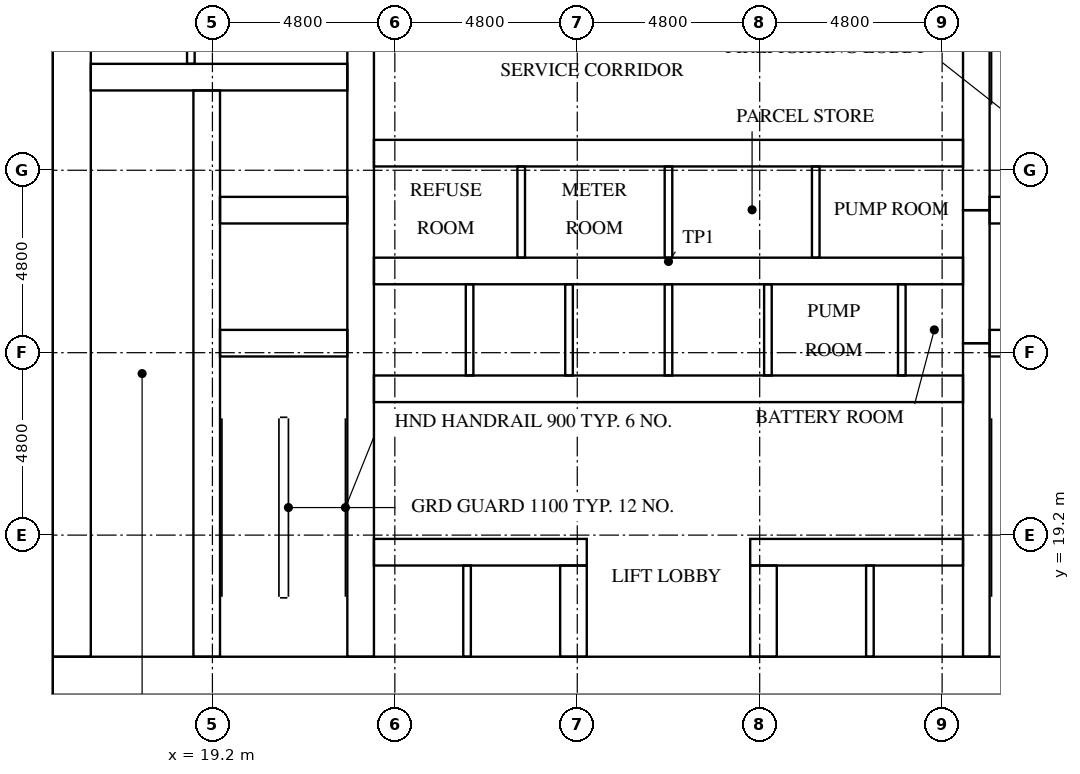
"""IFC4 building model, lengths in metres.
Left out: names, types, materials, properties, quantities, classifications, styles, units other than length and angle.
Written with IfcOpenShell. Run it as: python <this file> out.ifc"""

import sys

from ifc_helpers import new_model, si_unit, direction, frame, frame_2d, origin, place, context, subcontext, project, spatial, rectangle, extrude, element, fill, save


model = new_model("IFC4")
c1 = context("Model", 3, precision=1e-05, world=origin(), true_north=direction((0.0, 1.0)))
c2 = subcontext(c1, "Body", "Model", "MODEL_VIEW")
j1 = project(units=[si_unit("LENGTHUNIT", "METRE"), si_unit("PLANEANGLEUNIT", "RADIAN")], contexts=[c1])
p1 = place(None, origin())
s1 = spatial("IfcSite", under=j1, at=p1, CompositionType="ELEMENT")
p2 = place(p1, origin())
s2 = spatial("IfcBuilding", under=s1, at=p2, CompositionType="ELEMENT")
p3 = place(p2, frame((0.0, 0.0, 24.0)))
s3 = spatial("IfcBuildingStorey", under=s2, at=p3, CompositionType="ELEMENT", Elevation=24.0)
p4 = place(p3, frame((15.0, 15.5, 0.0), z_axis=(0.0, 0.0, 1.0), x_axis=(1.0, 0.0, 0.0)))
e1 = element("IfcWall", 1, at=p4, inside=s3, PredefinedType="SHEAR", context=c2, shape_type="SweptSolid", body=[
    extrude(rectangle(XDim=32.4, YDim=1.0, at=frame_2d((16.2, 0.0))), origin(), (0.0, 0.0, 1.0), 5.1),
])
p5 = place(p4, frame((15.3, 0.0, 0.0)))
e2 = element("IfcOpeningElement", 2, at=p5, cuts=e1, PredefinedType="OPENING", context=c2, shape_type="SweptSolid", body=[
    extrude(rectangle(XDim=1.8, YDim=2.1, at=frame_2d((0.9, 1.05))), frame((0.0, 0.51, 0.0), z_axis=(0.0, -1.0, 0.0), x_axis=(1.0, 0.0, 0.0)), (0.0, 0.0, 1.0), 1.02),
])
p6 = place(p3, frame((15.5, 16.0, 0.0), z_axis=(0.0, 0.0, 1.0), x_axis=(0.0, 1.0, 0.0)))
e3 = element("IfcWall", 3, at=p6, inside=s3, PredefinedType="SHEAR", context=c2, shape_type="SweptSolid", body=[
    extrude(rectangle(XDim=20.8, YDim=1.0, at=frame_2d((10.4, 0.0))), origin(), (0.0, 0.0, 1.0), 5.1),
])
p7 = place(p6, frame((4.76, 0.0, 0.0)))
e4 = element("IfcOpeningElement", 4, at=p7, cuts=e3, PredefinedType="OPENING", context=c2, shape_type="SweptSolid", body=[
    extrude(rectangle(XDim=1.2, YDim=2.1, at=frame_2d((0.6, 1.05))), frame((0.0, 0.51, 0.0), z_axis=(0.0, -1.0, 0.0), x_axis=(1.0, 0.0, 0.0)), (0.0, 0.0, 1.0), 1.02),
])
p8 = place(p3, frame((19.05, 16.0, 0.0), z_axis=(0.0, 0.0, 1.0), x_axis=(0.0, 1.0, 0.0)))
e5 = element("IfcWall", 5, at=p8, inside=s3, PredefinedType="SHEAR", context=c2, shape_type="SweptSolid", body=[
    extrude(rectangle(XDim=14.9, YDim=0.7, at=frame_2d((7.45, 0.0))), origin(), (0.0, 0.0, 1.0), 5.1),
])
p9 = place(p8, frame((9.45, 0.0, 0.0)))
e6 = element("IfcOpeningElement", 6, at=p9, cuts=e5, PredefinedType="OPENING", context=c2, shape_type="SweptSolid", body=[
    extrude(rectangle(XDim=1.1, YDim=2.1, at=frame_2d((0.55, 1.05))), frame((0.0, 0.36, 0.0), z_axis=(0.0, -1.0, 0.0), x_axis=(1.0, 0.0, 0.0)), (0.0, 0.0, 1.0), 0.72),
])
p10 = place(p8, frame((12.95, 0.0, 0.0)))
e7 = element("IfcOpeningElement", 7, at=p10, cuts=e5, PredefinedType="OPENING", context=c2, shape_type="SweptSolid", body=[
    extrude(rectangle(XDim=1.1, YDim=2.1, at=frame_2d((0.55, 1.05))), frame((0.0, 0.36, 0.0), z_axis=(0.0, -1.0, 0.0), x_axis=(1.0, 0.0, 0.0)), (0.0, 0.0, 1.0), 0.72),
])
p11 = place(p8, frame((0.2, 0.0, 0.0)))
e8 = element("IfcOpeningElement", 8, at=p11, cuts=e5, PredefinedType="OPENING", context=c2, shape_type="SweptSolid", body=[
    extrude(rectangle(XDim=1.2, YDim=2.1, at=frame_2d((0.6, 1.05))), frame((0.0, 0.36, 0.0), z_axis=(0.0, -1.0, 0.0), x_axis=(1.0, 0.0, 0.0)), (0.0, 0.0, 1.0), 0.72),
])
p12 = place(p3, frame((23.1, 16.0, 0.0), z_axis=(0.0, 0.0, 1.0), x_axis=(0.0, 1.0, 0.0)))
e9 = element("IfcWall", 9, at=p12, inside=s3, PredefinedType="SHEAR", context=c2, shape_type="SweptSolid", body=[
    extrude(rectangle(XDim=20.8, YDim=0.7, at=frame_2d((10.4, 0.0))), origin(), (0.0, 0.0, 1.0), 5.1),
])
p13 = place(p3, frame((39.3, 16.0, 0.0), z_axis=(0.0, 0.0, 1.0), x_axis=(0.0, 1.0, 0.0)))
e10 = element("IfcWall", 10, at=p13, inside=s3, PredefinedType="SHEAR", context=c2, shape_type="SweptSolid", body=[
    extrude(rectangle(XDim=8.25, YDim=0.7, at=frame_2d((4.125, 0.0))), origin(), (0.0, 0.0, 1.0), 5.1),
])
p14 = place(p3, frame((39.3, 24.25, 0.0), z_axis=(0.0, 0.0, 1.0), x_axis=(0.0, 1.0, 0.0)))
e11 = element("IfcWall", 11, at=p14, inside=s3, PredefinedType="SHEAR", context=c2, shape_type="SweptSolid", body=[
    extrude(rectangle(XDim=3.5, YDim=0.7, at=frame_2d((1.75, 0.0))), origin(), (0.0, 0.0, 1.0), 5.1),
])
p15 = place(p3, frame((39.3, 27.75, 0.0), z_axis=(0.0, 0.0, 1.0), x_axis=(0.0, 1.0, 0.0)))
e12 = element("IfcWall", 12, at=p15, inside=s3, PredefinedType="SHEAR", context=c2, shape_type="SweptSolid", body=[
    extrude(rectangle(XDim=9.05, YDim=0.7, at=frame_2d((4.525, 0.0))), origin(), (0.0, 0.0, 1.0), 5.1),
])
for number, where, z_axis, x_axis in (
    (13, (19.4, 24.25, 0.0), (0.0, 0.0, 1.0), (1.0, 0.0, 0.0)),
    (14, (19.4, 27.75, 0.0), (0.0, 0.0, 1.0), (1.0, 0.0, 0.0)),
):
    element("IfcWall", number, at=place(p3, frame(where, z_axis=z_axis, x_axis=x_axis)), inside=s3, PredefinedType="SHEAR", context=c2, shape_type="SweptSolid", body=[
        extrude(rectangle(XDim=3.35, YDim=0.7, at=frame_2d((1.675, 0.0))), origin(), (0.0, 0.0, 1.0), 5.1),
    ])
p16 = place(p3, frame((16.0, 31.25, 0.0), z_axis=(0.0, 0.0, 1.0), x_axis=(1.0, 0.0, 0.0)))
e15 = element("IfcWall", 15, at=p16, inside=s3, PredefinedType="SHEAR", context=c2, shape_type="SweptSolid", body=[
    extrude(rectangle(XDim=6.75, YDim=0.7, at=frame_2d((3.375, 0.0))), origin(), (0.0, 0.0, 1.0), 5.1),
])
for number, where, z_axis, x_axis in (
    (16, (39.65, 24.25, 0.0), (0.0, 0.0, 1.0), (1.0, 0.0, 0.0)),
    (17, (39.65, 27.75, 0.0), (0.0, 0.0, 1.0), (1.0, 0.0, 0.0)),
):
    element("IfcWall", number, at=place(p3, frame(where, z_axis=z_axis, x_axis=x_axis)), inside=s3, PredefinedType="SHEAR", context=c2, shape_type="SweptSolid", body=[
        extrude(rectangle(XDim=3.35, YDim=0.7, at=frame_2d((1.675, 0.0))), origin(), (0.0, 0.0, 1.0), 5.1),
    ])
p17 = place(p3, frame((23.45, 18.75, 0.0), z_axis=(0.0, 0.0, 1.0), x_axis=(1.0, 0.0, 0.0)))
e18 = element("IfcWall", 18, at=p17, inside=s3, PredefinedType="SHEAR", context=c2, shape_type="SweptSolid", body=[
    extrude(rectangle(XDim=5.6, YDim=0.7, at=frame_2d((2.8, 0.0))), origin(), (0.0, 0.0, 1.0), 5.1),
])
p18 = place(p17, frame((0.625, 0.0, 0.0)))
e19 = element("IfcOpeningElement", 19, at=p18, cuts=e18, PredefinedType="OPENING", context=c2, shape_type="SweptSolid", body=[
    extrude(rectangle(XDim=1.1, YDim=2.1, at=frame_2d((0.55, 1.05))), frame((0.0, 0.36, 0.0), z_axis=(0.0, -1.0, 0.0), x_axis=(1.0, 0.0, 0.0)), (0.0, 0.0, 1.0), 0.72),
])
p19 = place(p17, frame((3.175, 0.0, 0.0)))
e20 = element("IfcOpeningElement", 20, at=p19, cuts=e18, PredefinedType="OPENING", context=c2, shape_type="SweptSolid", body=[
    extrude(rectangle(XDim=1.1, YDim=2.1, at=frame_2d((0.55, 1.05))), frame((0.0, 0.36, 0.0), z_axis=(0.0, -1.0, 0.0), x_axis=(1.0, 0.0, 0.0)), (0.0, 0.0, 1.0), 0.72),
])
p20 = place(p3, frame((33.35, 18.75, 0.0), z_axis=(0.0, 0.0, 1.0), x_axis=(1.0, 0.0, 0.0)))
e21 = element("IfcWall", 21, at=p20, inside=s3, PredefinedType="SHEAR", context=c2, shape_type="SweptSolid", body=[
    extrude(rectangle(XDim=5.6, YDim=0.7, at=frame_2d((2.8, 0.0))), origin(), (0.0, 0.0, 1.0), 5.1),
])
p21 = place(p20, frame((1.325, 0.0, 0.0)))
e22 = element("IfcOpeningElement", 22, at=p21, cuts=e21, PredefinedType="OPENING", context=c2, shape_type="SweptSolid", body=[
    extrude(rectangle(XDim=1.1, YDim=2.1, at=frame_2d((0.55, 1.05))), frame((0.0, 0.36, 0.0), z_axis=(0.0, -1.0, 0.0), x_axis=(1.0, 0.0, 0.0)), (0.0, 0.0, 1.0), 0.72),
])
p22 = place(p20, frame((3.875, 0.0, 0.0)))
e23 = element("IfcOpeningElement", 23, at=p22, cuts=e21, PredefinedType="OPENING", context=c2, shape_type="SweptSolid", body=[
    extrude(rectangle(XDim=1.1, YDim=2.1, at=frame_2d((0.55, 1.05))), frame((0.0, 0.36, 0.0), z_axis=(0.0, -1.0, 0.0), x_axis=(1.0, 0.0, 0.0)), (0.0, 0.0, 1.0), 0.72),
])
p23 = place(p3, frame((23.45, 23.05, 0.0), z_axis=(0.0, 0.0, 1.0), x_axis=(1.0, 0.0, 0.0)))
e24 = element("IfcWall", 24, at=p23, inside=s3, PredefinedType="SHEAR", context=c2, shape_type="SweptSolid", body=[
    extrude(rectangle(XDim=15.5, YDim=0.7, at=frame_2d((7.75, 0.0))), origin(), (0.0, 0.0, 1.0), 5.1),
])
p24 = place(p23, frame((0.658, 0.0, 0.0)))
e25 = element("IfcOpeningElement", 25, at=p24, cuts=e24, PredefinedType="OPENING", context=c2, shape_type="SweptSolid", body=[
    extrude(rectangle(XDim=1.1, YDim=2.1, at=frame_2d((0.55, 1.05))), frame((0.0, 0.36, 0.0), z_axis=(0.0, -1.0, 0.0), x_axis=(1.0, 0.0, 0.0)), (0.0, 0.0, 1.0), 0.72),
])
p25 = place(p23, frame((3.275, 0.0, 0.0)))
e26 = element("IfcOpeningElement", 26, at=p25, cuts=e24, PredefinedType="OPENING", context=c2, shape_type="SweptSolid", body=[
    extrude(rectangle(XDim=1.1, YDim=2.1, at=frame_2d((0.55, 1.05))), frame((0.0, 0.36, 0.0), z_axis=(0.0, -1.0, 0.0), x_axis=(1.0, 0.0, 0.0)), (0.0, 0.0, 1.0), 0.72),
])
p26 = place(p23, frame((11.628, 0.0, 0.0)))
e27 = element("IfcOpeningElement", 27, at=p26, cuts=e24, PredefinedType="OPENING", context=c2, shape_type="SweptSolid", body=[
    extrude(rectangle(XDim=1.0, YDim=2.1, at=frame_2d((0.5, 1.05))), frame((0.0, 0.36, 0.0), z_axis=(0.0, -1.0, 0.0), x_axis=(1.0, 0.0, 0.0)), (0.0, 0.0, 1.0), 0.72),
])
p27 = place(p23, frame((14.245, 0.0, 0.0)))
e28 = element("IfcOpeningElement", 28, at=p27, cuts=e24, PredefinedType="OPENING", context=c2, shape_type="SweptSolid", body=[
    extrude(rectangle(XDim=1.0, YDim=2.1, at=frame_2d((0.5, 1.05))), frame((0.0, 0.36, 0.0), z_axis=(0.0, -1.0, 0.0), x_axis=(1.0, 0.0, 0.0)), (0.0, 0.0, 1.0), 0.72),
])
p28 = place(p3, frame((23.45, 26.15, 0.0), z_axis=(0.0, 0.0, 1.0), x_axis=(1.0, 0.0, 0.0)))
e29 = element("IfcWall", 29, at=p28, inside=s3, PredefinedType="SHEAR", context=c2, shape_type="SweptSolid", body=[
    extrude(rectangle(XDim=15.5, YDim=0.7, at=frame_2d((7.75, 0.0))), origin(), (0.0, 0.0, 1.0), 5.1),
])
p29 = place(p3, frame((23.45, 29.25, 0.0), z_axis=(0.0, 0.0, 1.0), x_axis=(1.0, 0.0, 0.0)))
e30 = element("IfcWall", 30, at=p29, inside=s3, PredefinedType="SHEAR", context=c2, shape_type="SweptSolid", body=[
    extrude(rectangle(XDim=15.5, YDim=0.7, at=frame_2d((7.75, 0.0))), origin(), (0.0, 0.0, 1.0), 5.1),
])
p30 = place(p29, frame((1.387, 0.0, 0.0)))
e31 = element("IfcOpeningElement", 31, at=p30, cuts=e30, PredefinedType="OPENING", context=c2, shape_type="SweptSolid", body=[
    extrude(rectangle(XDim=1.0, YDim=2.1, at=frame_2d((0.5, 1.05))), frame((0.0, 0.36, 0.0), z_axis=(0.0, -1.0, 0.0), x_axis=(1.0, 0.0, 0.0)), (0.0, 0.0, 1.0), 0.72),
])
p31 = place(p29, frame((5.312, 0.0, 0.0)))
e32 = element("IfcOpeningElement", 32, at=p31, cuts=e30, PredefinedType="OPENING", context=c2, shape_type="SweptSolid", body=[
    extrude(rectangle(XDim=1.0, YDim=2.1, at=frame_2d((0.5, 1.05))), frame((0.0, 0.36, 0.0), z_axis=(0.0, -1.0, 0.0), x_axis=(1.0, 0.0, 0.0)), (0.0, 0.0, 1.0), 0.72),
])
p32 = place(p29, frame((9.188, 0.0, 0.0)))
e33 = element("IfcOpeningElement", 33, at=p32, cuts=e30, PredefinedType="OPENING", context=c2, shape_type="SweptSolid", body=[
    extrude(rectangle(XDim=1.0, YDim=2.1, at=frame_2d((0.5, 1.05))), frame((0.0, 0.36, 0.0), z_axis=(0.0, -1.0, 0.0), x_axis=(1.0, 0.0, 0.0)), (0.0, 0.0, 1.0), 0.72),
])
p33 = place(p29, frame((13.113, 0.0, 0.0)))
e34 = element("IfcOpeningElement", 34, at=p33, cuts=e30, PredefinedType="OPENING", context=c2, shape_type="SweptSolid", body=[
    extrude(rectangle(XDim=1.0, YDim=2.1, at=frame_2d((0.5, 1.05))), frame((0.0, 0.36, 0.0), z_axis=(0.0, -1.0, 0.0), x_axis=(1.0, 0.0, 0.0)), (0.0, 0.0, 1.0), 0.72),
])
for number, where, z_axis, x_axis in (
    (35, (28.7, 16.0, 0.0), (0.0, 0.0, 1.0), (0.0, 1.0, 0.0)),
    (36, (33.7, 16.0, 0.0), (0.0, 0.0, 1.0), (0.0, 1.0, 0.0)),
):
    element("IfcWall", number, at=place(p3, frame(where, z_axis=z_axis, x_axis=x_axis)), inside=s3, PredefinedType="SHEAR", context=c2, shape_type="SweptSolid", body=[
        extrude(rectangle(XDim=2.4, YDim=0.7, at=frame_2d((1.2, 0.0))), origin(), (0.0, 0.0, 1.0), 5.1),
    ])
for number, where, z_axis, x_axis in (
    (37, (25.967, 23.4, 0.0), (0.0, 0.0, 1.0), (0.0, 1.0, 0.0)),
    (38, (28.583, 23.4, 0.0), (0.0, 0.0, 1.0), (0.0, 1.0, 0.0)),
    (39, (31.2, 23.4, 0.0), (0.0, 0.0, 1.0), (0.0, 1.0, 0.0)),
    (40, (33.817, 23.4, 0.0), (0.0, 0.0, 1.0), (0.0, 1.0, 0.0)),
):
    element("IfcWall", number, at=place(p3, frame(where, z_axis=z_axis, x_axis=x_axis)), inside=s3, PredefinedType="SOLIDWALL", context=c2, shape_type="SweptSolid", body=[
        extrude(rectangle(XDim=2.4, YDim=0.2, at=frame_2d((1.2, 0.0))), origin(), (0.0, 0.0, 1.0), 5.1),
    ])
for number, where, z_axis, x_axis in (
    (41, (25.9, 16.0, 0.0), (0.0, 0.0, 1.0), (0.0, 1.0, 0.0)),
    (42, (36.5, 16.0, 0.0), (0.0, 0.0, 1.0), (0.0, 1.0, 0.0)),
):
    element("IfcWall", number, at=place(p3, frame(where, z_axis=z_axis, x_axis=x_axis)), inside=s3, PredefinedType="SOLIDWALL", context=c2, shape_type="SweptSolid", body=[
        extrude(rectangle(XDim=2.4, YDim=0.2, at=frame_2d((1.2, 0.0))), origin(), (0.0, 0.0, 1.0), 5.1),
    ])
p34 = place(p3, frame((18.633, 31.6, 0.0), z_axis=(0.0, 0.0, 1.0), x_axis=(0.0, 1.0, 0.0)))
e43 = element("IfcWall", 43, at=p34, inside=s3, PredefinedType="PARTITIONING", context=c2, shape_type="SweptSolid", body=[
    extrude(rectangle(XDim=5.2, YDim=0.2, at=frame_2d((2.6, 0.0))), origin(), (0.0, 0.0, 1.0), 5.1),
])
p35 = place(p3, frame((37.339, 23.4, 0.0), z_axis=(0.0, 0.0, 1.0), x_axis=(0.0, 1.0, 0.0)))
e44 = element("IfcWall", 44, at=p35, inside=s3, PredefinedType="PARTITIONING", context=c2, shape_type="SweptSolid", body=[
    extrude(rectangle(XDim=2.4, YDim=0.2, at=frame_2d((1.2, 0.0))), origin(), (0.0, 0.0, 1.0), 5.1),
])
for number, where, z_axis, x_axis in (
    (45, (27.325, 26.5, 0.0), (0.0, 0.0, 1.0), (0.0, 1.0, 0.0)),
    (46, (31.2, 26.5, 0.0), (0.0, 0.0, 1.0), (0.0, 1.0, 0.0)),
    (47, (35.075, 26.5, 0.0), (0.0, 0.0, 1.0), (0.0, 1.0, 0.0)),
):
    element("IfcWall", number, at=place(p3, frame(where, z_axis=z_axis, x_axis=x_axis)), inside=s3, PredefinedType="PARTITIONING", context=c2, shape_type="SweptSolid", body=[
        extrude(rectangle(XDim=2.4, YDim=0.2, at=frame_2d((1.2, 0.0))), origin(), (0.0, 0.0, 1.0), 5.1),
    ])
p36 = place(p18, origin())
e48 = element("IfcDoor", 48, at=p36, inside=s3, OperationType="DOUBLE_DOOR_SLIDING", PredefinedType="DOOR", context=c2, shape_type="SweptSolid", body=[
    extrude(rectangle(XDim=1.1, YDim=2.1, at=frame_2d((0.55, 1.05))), frame((0.0, 0.025, 0.0), z_axis=(0.0, -1.0, 0.0), x_axis=(1.0, 0.0, 0.0)), (0.0, 0.0, 1.0), 0.05),
])
fill(e19, e48)
p37 = place(p19, origin())
e49 = element("IfcDoor", 49, at=p37, inside=s3, OperationType="DOUBLE_DOOR_SLIDING", PredefinedType="DOOR", context=c2, shape_type="SweptSolid", body=[
    extrude(rectangle(XDim=1.1, YDim=2.1, at=frame_2d((0.55, 1.05))), frame((0.0, 0.025, 0.0), z_axis=(0.0, -1.0, 0.0), x_axis=(1.0, 0.0, 0.0)), (0.0, 0.0, 1.0), 0.05),
])
fill(e20, e49)
p38 = place(p21, origin())
e50 = element("IfcDoor", 50, at=p38, inside=s3, OperationType="DOUBLE_DOOR_SLIDING", PredefinedType="DOOR", context=c2, shape_type="SweptSolid", body=[
    extrude(rectangle(XDim=1.1, YDim=2.1, at=frame_2d((0.55, 1.05))), frame((0.0, 0.025, 0.0), z_axis=(0.0, -1.0, 0.0), x_axis=(1.0, 0.0, 0.0)), (0.0, 0.0, 1.0), 0.05),
])
fill(e22, e50)
p39 = place(p22, origin())
e51 = element("IfcDoor", 51, at=p39, inside=s3, OperationType="DOUBLE_DOOR_SLIDING", PredefinedType="DOOR", context=c2, shape_type="SweptSolid", body=[
    extrude(rectangle(XDim=1.1, YDim=2.1, at=frame_2d((0.55, 1.05))), frame((0.0, 0.025, 0.0), z_axis=(0.0, -1.0, 0.0), x_axis=(1.0, 0.0, 0.0)), (0.0, 0.0, 1.0), 0.05),
])
fill(e23, e51)
p40 = place(p24, origin())
e52 = element("IfcDoor", 52, at=p40, inside=s3, OperationType="DOUBLE_DOOR_SLIDING", PredefinedType="DOOR", context=c2, shape_type="SweptSolid", body=[
    extrude(rectangle(XDim=1.1, YDim=2.1, at=frame_2d((0.55, 1.05))), frame((0.0, 0.025, 0.0), z_axis=(0.0, -1.0, 0.0), x_axis=(1.0, 0.0, 0.0)), (0.0, 0.0, 1.0), 0.05),
])
fill(e25, e52)
p41 = place(p25, origin())
e53 = element("IfcDoor", 53, at=p41, inside=s3, OperationType="DOUBLE_DOOR_SLIDING", PredefinedType="DOOR", context=c2, shape_type="SweptSolid", body=[
    extrude(rectangle(XDim=1.1, YDim=2.1, at=frame_2d((0.55, 1.05))), frame((0.0, 0.025, 0.0), z_axis=(0.0, -1.0, 0.0), x_axis=(1.0, 0.0, 0.0)), (0.0, 0.0, 1.0), 0.05),
])
fill(e26, e53)
p42 = place(p9, origin())
e54 = element("IfcDoor", 54, at=p42, inside=s3, OperationType="DOUBLE_DOOR_SLIDING", PredefinedType="DOOR", context=c2, shape_type="SweptSolid", body=[
    extrude(rectangle(XDim=1.1, YDim=2.1, at=frame_2d((0.55, 1.05))), frame((0.0, 0.025, 0.0), z_axis=(0.0, -1.0, 0.0), x_axis=(1.0, 0.0, 0.0)), (0.0, 0.0, 1.0), 0.05),
])
fill(e6, e54)
p43 = place(p10, origin())
e55 = element("IfcDoor", 55, at=p43, inside=s3, OperationType="DOUBLE_DOOR_SLIDING", PredefinedType="DOOR", context=c2, shape_type="SweptSolid", body=[
    extrude(rectangle(XDim=1.1, YDim=2.1, at=frame_2d((0.55, 1.05))), frame((0.0, 0.025, 0.0), z_axis=(0.0, -1.0, 0.0), x_axis=(1.0, 0.0, 0.0)), (0.0, 0.0, 1.0), 0.05),
])
fill(e7, e55)
p44 = place(p11, frame((1.2, 0.0, 0.0), z_axis=(0.0, 0.0, 1.0), x_axis=(-1.0, 0.0, 0.0)))
e56 = element("IfcDoor", 56, at=p44, inside=s3, OperationType="SINGLE_SWING_LEFT", PredefinedType="DOOR", context=c2, shape_type="SweptSolid", body=[
    extrude(rectangle(XDim=1.2, YDim=2.1, at=frame_2d((0.6, 1.05))), frame((0.0, 0.025, 0.0), z_axis=(0.0, -1.0, 0.0), x_axis=(1.0, 0.0, 0.0)), (0.0, 0.0, 1.0), 0.05),
])
fill(e8, e56)
p45 = place(p5, frame((1.8, 0.0, 0.0), z_axis=(0.0, 0.0, 1.0), x_axis=(-1.0, 0.0, 0.0)))
e57 = element("IfcDoor", 57, at=p45, inside=s3, OperationType="DOUBLE_DOOR_SINGLE_SWING", PredefinedType="DOOR", context=c2, shape_type="SweptSolid", body=[
    extrude(rectangle(XDim=1.8, YDim=2.1, at=frame_2d((0.9, 1.05))), frame((0.0, 0.025, 0.0), z_axis=(0.0, -1.0, 0.0), x_axis=(1.0, 0.0, 0.0)), (0.0, 0.0, 1.0), 0.05),
])
fill(e2, e57)
p46 = place(p7, frame((1.2, 0.0, 0.0), z_axis=(0.0, 0.0, 1.0), x_axis=(-1.0, 0.0, 0.0)))
e58 = element("IfcDoor", 58, at=p46, inside=s3, OperationType="SINGLE_SWING_RIGHT", PredefinedType="DOOR", context=c2, shape_type="SweptSolid", body=[
    extrude(rectangle(XDim=1.2, YDim=2.1, at=frame_2d((0.6, 1.05))), frame((0.0, 0.025, 0.0), z_axis=(0.0, -1.0, 0.0), x_axis=(1.0, 0.0, 0.0)), (0.0, 0.0, 1.0), 0.05),
])
fill(e4, e58)
p47 = place(p26, frame((1.0, 0.0, 0.0), z_axis=(0.0, 0.0, 1.0), x_axis=(-1.0, 0.0, 0.0)))
e59 = element("IfcDoor", 59, at=p47, inside=s3, OperationType="SINGLE_SWING_RIGHT", PredefinedType="DOOR", context=c2, shape_type="SweptSolid", body=[
    extrude(rectangle(XDim=1.0, YDim=2.1, at=frame_2d((0.5, 1.05))), frame((0.0, 0.025, 0.0), z_axis=(0.0, -1.0, 0.0), x_axis=(1.0, 0.0, 0.0)), (0.0, 0.0, 1.0), 0.05),
])
fill(e27, e59)
p48 = place(p27, frame((1.0, 0.0, 0.0), z_axis=(0.0, 0.0, 1.0), x_axis=(-1.0, 0.0, 0.0)))
e60 = element("IfcDoor", 60, at=p48, inside=s3, OperationType="SINGLE_SWING_LEFT", PredefinedType="DOOR", context=c2, shape_type="SweptSolid", body=[
    extrude(rectangle(XDim=1.0, YDim=2.1, at=frame_2d((0.5, 1.05))), frame((0.0, 0.025, 0.0), z_axis=(0.0, -1.0, 0.0), x_axis=(1.0, 0.0, 0.0)), (0.0, 0.0, 1.0), 0.05),
])
fill(e28, e60)
p49 = place(p30, origin())
e61 = element("IfcDoor", 61, at=p49, inside=s3, OperationType="SINGLE_SWING_RIGHT", PredefinedType="DOOR", context=c2, shape_type="SweptSolid", body=[
    extrude(rectangle(XDim=1.0, YDim=2.1, at=frame_2d((0.5, 1.05))), frame((0.0, 0.025, 0.0), z_axis=(0.0, -1.0, 0.0), x_axis=(1.0, 0.0, 0.0)), (0.0, 0.0, 1.0), 0.05),
])
fill(e31, e61)
p50 = place(p31, origin())
e62 = element("IfcDoor", 62, at=p50, inside=s3, OperationType="SINGLE_SWING_LEFT", PredefinedType="DOOR", context=c2, shape_type="SweptSolid", body=[
    extrude(rectangle(XDim=1.0, YDim=2.1, at=frame_2d((0.5, 1.05))), frame((0.0, 0.025, 0.0), z_axis=(0.0, -1.0, 0.0), x_axis=(1.0, 0.0, 0.0)), (0.0, 0.0, 1.0), 0.05),
])
fill(e32, e62)
p51 = place(p32, origin())
e63 = element("IfcDoor", 63, at=p51, inside=s3, OperationType="SINGLE_SWING_RIGHT", PredefinedType="DOOR", context=c2, shape_type="SweptSolid", body=[
    extrude(rectangle(XDim=1.0, YDim=2.1, at=frame_2d((0.5, 1.05))), frame((0.0, 0.025, 0.0), z_axis=(0.0, -1.0, 0.0), x_axis=(1.0, 0.0, 0.0)), (0.0, 0.0, 1.0), 0.05),
])
fill(e33, e63)
p52 = place(p33, origin())
e64 = element("IfcDoor", 64, at=p52, inside=s3, OperationType="SINGLE_SWING_LEFT", PredefinedType="DOOR", context=c2, shape_type="SweptSolid", body=[
    extrude(rectangle(XDim=1.0, YDim=2.1, at=frame_2d((0.5, 1.05))), frame((0.0, 0.025, 0.0), z_axis=(0.0, -1.0, 0.0), x_axis=(1.0, 0.0, 0.0)), (0.0, 0.0, 1.0), 0.05),
])
fill(e34, e64)
save(model, sys.argv[1])
